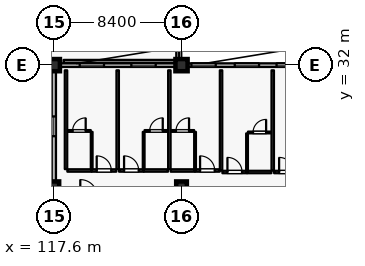
"""IFC4 building model, lengths in metres.
Left out: names, types, materials, properties, quantities, classifications, styles, units other than length and angle.
Written with IfcOpenShell. Run it as: python <this file> out.ifc"""

import sys

from ifc_helpers import new_model, si_unit, direction, frame, frame_2d, origin, origin_2d, place, context, subcontext, project, spatial, rectangle, extrude, element, fill, save


model = new_model("IFC4")
c1 = context("Model", 3, precision=1e-05, world=origin(), true_north=direction((0.0, 1.0)))
c2 = subcontext(c1, "Body", "Model", "MODEL_VIEW")
j1 = project(units=[si_unit("LENGTHUNIT", "METRE"), si_unit("PLANEANGLEUNIT", "RADIAN")], contexts=[c1])
p1 = place(None, origin())
s1 = spatial("IfcSite", under=j1, at=p1, CompositionType="ELEMENT")
p2 = place(p1, origin())
s2 = spatial("IfcBuilding", under=s1, at=p2, CompositionType="ELEMENT")
p3 = place(p2, frame((0.0, 0.0, 21.0)))
s3 = spatial("IfcBuildingStorey", under=s2, at=p3, CompositionType="ELEMENT", Elevation=21.0)
for number, where, z_axis, x_axis in (
    (1, (117.6, 32.0, 0.0), (0.0, 0.0, 1.0), (1.0, 0.0, 0.0)),
    (2, (126.0, 32.0, 0.0), (0.0, 0.0, 1.0), (1.0, 0.0, 0.0)),
):
    element("IfcColumn", number, at=place(p3, frame(where, z_axis=z_axis, x_axis=x_axis)), inside=s3, PredefinedType="COLUMN", context=c2, shape_type="SweptSolid", body=[
        extrude(rectangle(XDim=0.8, YDim=0.8, at=origin_2d()), origin(), (0.0, 0.0, 1.0), 4.2),
    ])
for number, where, z_axis, x_axis in (
    (3, (117.6, 24.0, 0.0), (0.0, 0.0, 1.0), (1.0, 0.0, 0.0)),
    (4, (126.0, 24.0, 0.0), (0.0, 0.0, 1.0), (1.0, 0.0, 0.0)),
):
    element("IfcColumn", number, at=place(p3, frame(where, z_axis=z_axis, x_axis=x_axis)), inside=s3, PredefinedType="COLUMN", context=c2, shape_type="SweptSolid", body=[
        extrude(rectangle(XDim=0.7, YDim=0.7, at=origin_2d()), origin(), (0.0, 0.0, 1.0), 4.2),
    ])
p4 = place(p3, frame((118.0, 32.0, 0.0), z_axis=(0.0, 0.0, 1.0), x_axis=(1.0, 0.0, 0.0)))
e5 = element("IfcWall", 5, at=p4, inside=s3, PredefinedType="SOLIDWALL", context=c2, shape_type="SweptSolid", body=[
    extrude(rectangle(XDim=7.6, YDim=0.24, at=frame_2d((3.8, 0.0))), origin(), (0.0, 0.0, 1.0), 3.53),
])
p5 = place(p4, frame((1.3, 0.0, 0.8)))
e6 = element("IfcOpeningElement", 6, at=p5, cuts=e5, PredefinedType="OPENING", context=c2, shape_type="SweptSolid", body=[
    extrude(rectangle(XDim=1.6, YDim=1.6, at=frame_2d((0.8, 0.8))), frame((0.0, 0.13, 0.0), z_axis=(0.0, -1.0, 0.0), x_axis=(1.0, 0.0, 0.0)), (0.0, 0.0, 1.0), 0.26),
])
p6 = place(p4, frame((4.7, 0.0, 0.8)))
e7 = element("IfcOpeningElement", 7, at=p6, cuts=e5, PredefinedType="OPENING", context=c2, shape_type="SweptSolid", body=[
    extrude(rectangle(XDim=1.6, YDim=1.6, at=frame_2d((0.8, 0.8))), frame((0.0, 0.13, 0.0), z_axis=(0.0, -1.0, 0.0), x_axis=(1.0, 0.0, 0.0)), (0.0, 0.0, 1.0), 0.26),
])
p7 = place(p3, frame((126.4, 32.0, 0.0), z_axis=(0.0, 0.0, 1.0), x_axis=(1.0, 0.0, 0.0)))
e8 = element("IfcWall", 8, at=p7, inside=s3, PredefinedType="SOLIDWALL", context=c2, shape_type="SweptSolid", body=[
    extrude(rectangle(XDim=7.6, YDim=0.24, at=frame_2d((3.8, 0.0))), origin(), (0.0, 0.0, 1.0), 3.53),
])
p8 = place(p7, frame((0.25, 0.0, 0.8)))
e9 = element("IfcOpeningElement", 9, at=p8, cuts=e8, PredefinedType="OPENING", context=c2, shape_type="SweptSolid", body=[
    extrude(rectangle(XDim=1.6, YDim=1.6, at=frame_2d((0.8, 0.8))), frame((0.0, 0.13, 0.0), z_axis=(0.0, -1.0, 0.0), x_axis=(1.0, 0.0, 0.0)), (0.0, 0.0, 1.0), 0.26),
])
p9 = place(p7, frame((3.1, 0.0, 0.8)))
e10 = element("IfcOpeningElement", 10, at=p9, cuts=e8, PredefinedType="OPENING", context=c2, shape_type="SweptSolid", body=[
    extrude(rectangle(XDim=1.6, YDim=1.6, at=frame_2d((0.8, 0.8))), frame((0.0, 0.13, 0.0), z_axis=(0.0, -1.0, 0.0), x_axis=(1.0, 0.0, 0.0)), (0.0, 0.0, 1.0), 0.26),
])
p10 = place(p7, frame((5.85, 0.0, 0.8)))
e11 = element("IfcOpeningElement", 11, at=p10, cuts=e8, PredefinedType="OPENING", context=c2, shape_type="SweptSolid", body=[
    extrude(rectangle(XDim=1.6, YDim=1.6, at=frame_2d((0.8, 0.8))), frame((0.0, 0.13, 0.0), z_axis=(0.0, -1.0, 0.0), x_axis=(1.0, 0.0, 0.0)), (0.0, 0.0, 1.0), 0.26),
])
p11 = place(p3, frame((117.6, 24.35, 0.0), z_axis=(0.0, 0.0, 1.0), x_axis=(0.0, 1.0, 0.0)))
e12 = element("IfcWall", 12, at=p11, inside=s3, PredefinedType="SOLIDWALL", context=c2, shape_type="SweptSolid", body=[
    extrude(rectangle(XDim=7.25, YDim=0.28, at=frame_2d((3.625, 0.0))), origin(), (0.0, 0.0, 1.0), 3.3),
])
p12 = place(p11, frame((2.975, 0.0, 0.75)))
e13 = element("IfcOpeningElement", 13, at=p12, cuts=e12, PredefinedType="OPENING", context=c2, shape_type="SweptSolid", body=[
    extrude(rectangle(XDim=1.3, YDim=1.65, at=frame_2d((0.65, 0.825))), frame((0.0, 0.15, 0.0), z_axis=(0.0, -1.0, 0.0), x_axis=(1.0, 0.0, 0.0)), (0.0, 0.0, 1.0), 0.3),
])
p13 = place(p3, frame((125.75, 71.61, 0.0), z_axis=(0.0, 0.0, 1.0), x_axis=(0.0, -1.0, 0.0)))
e14 = element("IfcWall", 14, at=p13, inside=s3, PredefinedType="PARAPET", context=c2, shape_type="SweptSolid", body=[
    extrude(rectangle(XDim=39.22, YDim=0.19, at=frame_2d((19.61, 0.0))), origin(), (0.0, 0.0, 1.0), 1.2),
])
p14 = place(p3, frame((125.61, 32.25, 0.0), z_axis=(0.0, 0.0, 1.0), x_axis=(-1.0, 0.0, 0.0)))
e15 = element("IfcWall", 15, at=p14, inside=s3, PredefinedType="PARAPET", context=c2, shape_type="SweptSolid", body=[
    extrude(rectangle(XDim=7.37, YDim=0.19, at=frame_2d((3.685, 0.0))), origin(), (0.0, 0.0, 1.0), 1.2),
])
p15 = place(p3, frame((118.49, 25.07, 0.0), z_axis=(0.0, 0.0, 1.0), x_axis=(1.0, 0.0, 0.0)))
e16 = element("IfcWall", 16, at=p15, inside=s3, PredefinedType="PARTITIONING", context=c2, shape_type="SweptSolid", body=[
    extrude(rectangle(XDim=1.59, YDim=0.16, at=frame_2d((0.795, 0.0))), origin(), (0.0, 0.0, 1.0), 3.965),
])
p16 = place(p3, frame((120.09, 25.07, 0.0), z_axis=(0.0, 0.0, 1.0), x_axis=(1.0, 0.0, 0.0)))
e17 = element("IfcWall", 17, at=p16, inside=s3, PredefinedType="PARTITIONING", context=c2, shape_type="SweptSolid", body=[
    extrude(rectangle(XDim=1.62, YDim=0.16, at=frame_2d((0.81, 0.0))), origin(), (0.0, 0.0, 1.0), 3.965),
])
p17 = place(p16, frame((0.33, 0.0, 0.0)))
e18 = element("IfcOpeningElement", 18, at=p17, cuts=e17, PredefinedType="OPENING", context=c2, shape_type="SweptSolid", body=[
    extrude(rectangle(XDim=0.96, YDim=2.2, at=frame_2d((0.48, 1.1))), frame((0.0, 0.09, 0.0), z_axis=(0.0, -1.0, 0.0), x_axis=(1.0, 0.0, 0.0)), (0.0, 0.0, 1.0), 0.18),
])
p18 = place(p3, frame((120.09, 25.16, 0.0), z_axis=(0.0, 0.0, 1.0), x_axis=(0.0, 1.0, 0.0)))
e19 = element("IfcWall", 19, at=p18, inside=s3, PredefinedType="PARTITIONING", context=c2, shape_type="SweptSolid", body=[
    extrude(rectangle(XDim=2.45, YDim=0.115, at=frame_2d((1.225, 0.0))), origin(), (0.0, 0.0, 1.0), 3.965),
])
p19 = place(p3, frame((118.5, 27.67, 0.0), z_axis=(0.0, 0.0, 1.0), x_axis=(1.0, 0.0, 0.0)))
e20 = element("IfcWall", 20, at=p19, inside=s3, PredefinedType="PARTITIONING", context=c2, shape_type="SweptSolid", body=[
    extrude(rectangle(XDim=1.53, YDim=0.115, at=frame_2d((0.765, 0.0))), origin(), (0.0, 0.0, 1.0), 3.965),
])
p20 = place(p19, frame((0.335, 0.0, 0.0)))
e21 = element("IfcOpeningElement", 21, at=p20, cuts=e20, PredefinedType="OPENING", context=c2, shape_type="SweptSolid", body=[
    extrude(rectangle(XDim=0.86, YDim=2.12, at=frame_2d((0.43, 1.06))), frame((0.0, 0.067, 0.0), z_axis=(0.0, -1.0, 0.0), x_axis=(1.0, 0.0, 0.0)), (0.0, 0.0, 1.0), 0.135),
])
p21 = place(p3, frame((118.4, 25.16, 0.0), z_axis=(0.0, 0.0, 1.0), x_axis=(0.0, 1.0, 0.0)))
e22 = element("IfcWall", 22, at=p21, inside=s3, PredefinedType="PARTITIONING", context=c2, shape_type="SweptSolid", body=[
    extrude(rectangle(XDim=6.5, YDim=0.16, at=frame_2d((3.25, 0.0))), origin(), (0.0, 0.0, 1.0), 3.965),
])
p22 = place(p3, frame((121.89, 25.07, 0.0), z_axis=(0.0, 0.0, 1.0), x_axis=(1.0, 0.0, 0.0)))
e23 = element("IfcWall", 23, at=p22, inside=s3, PredefinedType="PARTITIONING", context=c2, shape_type="SweptSolid", body=[
    extrude(rectangle(XDim=1.62, YDim=0.16, at=frame_2d((0.81, 0.0))), origin(), (0.0, 0.0, 1.0), 3.965),
])
p23 = place(p22, frame((0.33, 0.0, 0.0)))
e24 = element("IfcOpeningElement", 24, at=p23, cuts=e23, PredefinedType="OPENING", context=c2, shape_type="SweptSolid", body=[
    extrude(rectangle(XDim=0.96, YDim=2.2, at=frame_2d((0.48, 1.1))), frame((0.0, 0.09, 0.0), z_axis=(0.0, -1.0, 0.0), x_axis=(1.0, 0.0, 0.0)), (0.0, 0.0, 1.0), 0.18),
])
p24 = place(p3, frame((123.52, 25.07, 0.0), z_axis=(0.0, 0.0, 1.0), x_axis=(1.0, 0.0, 0.0)))
e25 = element("IfcWall", 25, at=p24, inside=s3, PredefinedType="PARTITIONING", context=c2, shape_type="SweptSolid", body=[
    extrude(rectangle(XDim=1.59, YDim=0.16, at=frame_2d((0.795, 0.0))), origin(), (0.0, 0.0, 1.0), 3.965),
])
p25 = place(p3, frame((123.51, 25.16, 0.0), z_axis=(0.0, 0.0, 1.0), x_axis=(0.0, 1.0, 0.0)))
e26 = element("IfcWall", 26, at=p25, inside=s3, PredefinedType="PARTITIONING", context=c2, shape_type="SweptSolid", body=[
    extrude(rectangle(XDim=2.45, YDim=0.115, at=frame_2d((1.225, 0.0))), origin(), (0.0, 0.0, 1.0), 3.965),
])
p26 = place(p3, frame((123.57, 27.67, 0.0), z_axis=(0.0, 0.0, 1.0), x_axis=(1.0, 0.0, 0.0)))
e27 = element("IfcWall", 27, at=p26, inside=s3, PredefinedType="PARTITIONING", context=c2, shape_type="SweptSolid", body=[
    extrude(rectangle(XDim=1.53, YDim=0.115, at=frame_2d((0.765, 0.0))), origin(), (0.0, 0.0, 1.0), 3.965),
])
p27 = place(p26, frame((0.335, 0.0, 0.0)))
e28 = element("IfcOpeningElement", 28, at=p27, cuts=e27, PredefinedType="OPENING", context=c2, shape_type="SweptSolid", body=[
    extrude(rectangle(XDim=0.86, YDim=2.12, at=frame_2d((0.43, 1.06))), frame((0.0, 0.067, 0.0), z_axis=(0.0, -1.0, 0.0), x_axis=(1.0, 0.0, 0.0)), (0.0, 0.0, 1.0), 0.135),
])
p28 = place(p3, frame((121.8, 25.16, 0.0), z_axis=(0.0, 0.0, 1.0), x_axis=(0.0, 1.0, 0.0)))
e29 = element("IfcWall", 29, at=p28, inside=s3, PredefinedType="PARTITIONING", context=c2, shape_type="SweptSolid", body=[
    extrude(rectangle(XDim=6.5, YDim=0.16, at=frame_2d((3.25, 0.0))), origin(), (0.0, 0.0, 1.0), 3.965),
])
p29 = place(p3, frame((125.29, 25.07, 0.0), z_axis=(0.0, 0.0, 1.0), x_axis=(1.0, 0.0, 0.0)))
e30 = element("IfcWall", 30, at=p29, inside=s3, PredefinedType="PARTITIONING", context=c2, shape_type="SweptSolid", body=[
    extrude(rectangle(XDim=1.59, YDim=0.16, at=frame_2d((0.795, 0.0))), origin(), (0.0, 0.0, 1.0), 3.965),
])
p30 = place(p3, frame((126.89, 25.07, 0.0), z_axis=(0.0, 0.0, 1.0), x_axis=(1.0, 0.0, 0.0)))
e31 = element("IfcWall", 31, at=p30, inside=s3, PredefinedType="PARTITIONING", context=c2, shape_type="SweptSolid", body=[
    extrude(rectangle(XDim=1.62, YDim=0.16, at=frame_2d((0.81, 0.0))), origin(), (0.0, 0.0, 1.0), 3.965),
])
p31 = place(p30, frame((0.33, 0.0, 0.0)))
e32 = element("IfcOpeningElement", 32, at=p31, cuts=e31, PredefinedType="OPENING", context=c2, shape_type="SweptSolid", body=[
    extrude(rectangle(XDim=0.96, YDim=2.2, at=frame_2d((0.48, 1.1))), frame((0.0, 0.09, 0.0), z_axis=(0.0, -1.0, 0.0), x_axis=(1.0, 0.0, 0.0)), (0.0, 0.0, 1.0), 0.18),
])
p32 = place(p3, frame((126.89, 25.16, 0.0), z_axis=(0.0, 0.0, 1.0), x_axis=(0.0, 1.0, 0.0)))
e33 = element("IfcWall", 33, at=p32, inside=s3, PredefinedType="PARTITIONING", context=c2, shape_type="SweptSolid", body=[
    extrude(rectangle(XDim=2.45, YDim=0.115, at=frame_2d((1.225, 0.0))), origin(), (0.0, 0.0, 1.0), 3.965),
])
p33 = place(p3, frame((125.3, 27.67, 0.0), z_axis=(0.0, 0.0, 1.0), x_axis=(1.0, 0.0, 0.0)))
e34 = element("IfcWall", 34, at=p33, inside=s3, PredefinedType="PARTITIONING", context=c2, shape_type="SweptSolid", body=[
    extrude(rectangle(XDim=1.53, YDim=0.115, at=frame_2d((0.765, 0.0))), origin(), (0.0, 0.0, 1.0), 3.965),
])
p34 = place(p33, frame((0.335, 0.0, 0.0)))
e35 = element("IfcOpeningElement", 35, at=p34, cuts=e34, PredefinedType="OPENING", context=c2, shape_type="SweptSolid", body=[
    extrude(rectangle(XDim=0.86, YDim=2.12, at=frame_2d((0.43, 1.06))), frame((0.0, 0.067, 0.0), z_axis=(0.0, -1.0, 0.0), x_axis=(1.0, 0.0, 0.0)), (0.0, 0.0, 1.0), 0.135),
])
p35 = place(p3, frame((125.2, 25.16, 0.0), z_axis=(0.0, 0.0, 1.0), x_axis=(0.0, 1.0, 0.0)))
e36 = element("IfcWall", 36, at=p35, inside=s3, PredefinedType="PARTITIONING", context=c2, shape_type="SweptSolid", body=[
    extrude(rectangle(XDim=6.5, YDim=0.16, at=frame_2d((3.25, 0.0))), origin(), (0.0, 0.0, 1.0), 3.965),
])
p36 = place(p3, frame((128.69, 24.97, 0.0), z_axis=(0.0, 0.0, 1.0), x_axis=(1.0, 0.0, 0.0)))
e37 = element("IfcWall", 37, at=p36, inside=s3, PredefinedType="PARTITIONING", context=c2, shape_type="SweptSolid", body=[
    extrude(rectangle(XDim=1.62, YDim=0.16, at=frame_2d((0.81, 0.0))), origin(), (0.0, 0.0, 1.0), 3.965),
])
p37 = place(p36, frame((0.33, 0.0, 0.0)))
e38 = element("IfcOpeningElement", 38, at=p37, cuts=e37, PredefinedType="OPENING", context=c2, shape_type="SweptSolid", body=[
    extrude(rectangle(XDim=0.96, YDim=2.2, at=frame_2d((0.48, 1.1))), frame((0.0, 0.09, 0.0), z_axis=(0.0, -1.0, 0.0), x_axis=(1.0, 0.0, 0.0)), (0.0, 0.0, 1.0), 0.18),
])
p38 = place(p3, frame((130.32, 24.97, 0.0), z_axis=(0.0, 0.0, 1.0), x_axis=(1.0, 0.0, 0.0)))
e39 = element("IfcWall", 39, at=p38, inside=s3, PredefinedType="PARTITIONING", context=c2, shape_type="SweptSolid", body=[
    extrude(rectangle(XDim=1.59, YDim=0.16, at=frame_2d((0.795, 0.0))), origin(), (0.0, 0.0, 1.0), 3.965),
])
p39 = place(p3, frame((130.31, 25.06, 0.0), z_axis=(0.0, 0.0, 1.0), x_axis=(0.0, 1.0, 0.0)))
e40 = element("IfcWall", 40, at=p39, inside=s3, PredefinedType="PARTITIONING", context=c2, shape_type="SweptSolid", body=[
    extrude(rectangle(XDim=2.45, YDim=0.115, at=frame_2d((1.225, 0.0))), origin(), (0.0, 0.0, 1.0), 3.965),
])
p40 = place(p3, frame((130.37, 27.57, 0.0), z_axis=(0.0, 0.0, 1.0), x_axis=(1.0, 0.0, 0.0)))
e41 = element("IfcWall", 41, at=p40, inside=s3, PredefinedType="PARTITIONING", context=c2, shape_type="SweptSolid", body=[
    extrude(rectangle(XDim=1.53, YDim=0.115, at=frame_2d((0.765, 0.0))), origin(), (0.0, 0.0, 1.0), 3.965),
])
p41 = place(p40, frame((0.335, 0.0, 0.0)))
e42 = element("IfcOpeningElement", 42, at=p41, cuts=e41, PredefinedType="OPENING", context=c2, shape_type="SweptSolid", body=[
    extrude(rectangle(XDim=0.86, YDim=2.12, at=frame_2d((0.43, 1.06))), frame((0.0, 0.067, 0.0), z_axis=(0.0, -1.0, 0.0), x_axis=(1.0, 0.0, 0.0)), (0.0, 0.0, 1.0), 0.135),
])
p42 = place(p3, frame((128.6, 25.06, 0.0), z_axis=(0.0, 0.0, 1.0), x_axis=(0.0, 1.0, 0.0)))
e43 = element("IfcWall", 43, at=p42, inside=s3, PredefinedType="PARTITIONING", context=c2, shape_type="SweptSolid", body=[
    extrude(rectangle(XDim=6.6, YDim=0.16, at=frame_2d((3.3, 0.0))), origin(), (0.0, 0.0, 1.0), 3.965),
])
p43 = place(p3, frame((132.09, 24.97, 0.0), z_axis=(0.0, 0.0, 1.0), x_axis=(1.0, 0.0, 0.0)))
e44 = element("IfcWall", 44, at=p43, inside=s3, PredefinedType="PARTITIONING", context=c2, shape_type="SweptSolid", body=[
    extrude(rectangle(XDim=1.62, YDim=0.16, at=frame_2d((0.81, 0.0))), origin(), (0.0, 0.0, 1.0), 3.965),
])
p44 = place(p43, frame((0.33, 0.0, 0.0)))
e45 = element("IfcOpeningElement", 45, at=p44, cuts=e44, PredefinedType="OPENING", context=c2, shape_type="SweptSolid", body=[
    extrude(rectangle(XDim=0.96, YDim=2.2, at=frame_2d((0.48, 1.1))), frame((0.0, 0.09, 0.0), z_axis=(0.0, -1.0, 0.0), x_axis=(1.0, 0.0, 0.0)), (0.0, 0.0, 1.0), 0.18),
])
p45 = place(p3, frame((132.0, 25.06, 0.0), z_axis=(0.0, 0.0, 1.0), x_axis=(0.0, 1.0, 0.0)))
e46 = element("IfcWall", 46, at=p45, inside=s3, PredefinedType="PARTITIONING", context=c2, shape_type="SweptSolid", body=[
    extrude(rectangle(XDim=6.6, YDim=0.16, at=frame_2d((3.3, 0.0))), origin(), (0.0, 0.0, 1.0), 3.965),
])
p46 = place(p5, origin())
e47 = element("IfcWindow", 47, at=p46, inside=s3, PartitioningType="SINGLE_PANEL", PredefinedType="WINDOW", context=c2, shape_type="SweptSolid", body=[
    extrude(rectangle(XDim=1.6, YDim=1.6, at=frame_2d((0.8, 0.8))), frame((0.0, 0.03, 0.0), z_axis=(0.0, -1.0, 0.0), x_axis=(1.0, 0.0, 0.0)), (0.0, 0.0, 1.0), 0.06),
])
fill(e6, e47)
p47 = place(p6, origin())
e48 = element("IfcWindow", 48, at=p47, inside=s3, PartitioningType="SINGLE_PANEL", PredefinedType="WINDOW", context=c2, shape_type="SweptSolid", body=[
    extrude(rectangle(XDim=1.6, YDim=1.6, at=frame_2d((0.8, 0.8))), frame((0.0, 0.03, 0.0), z_axis=(0.0, -1.0, 0.0), x_axis=(1.0, 0.0, 0.0)), (0.0, 0.0, 1.0), 0.06),
])
fill(e7, e48)
p48 = place(p8, origin())
e49 = element("IfcWindow", 49, at=p48, inside=s3, PartitioningType="SINGLE_PANEL", PredefinedType="WINDOW", context=c2, shape_type="SweptSolid", body=[
    extrude(rectangle(XDim=1.6, YDim=1.6, at=frame_2d((0.8, 0.8))), frame((0.0, 0.03, 0.0), z_axis=(0.0, -1.0, 0.0), x_axis=(1.0, 0.0, 0.0)), (0.0, 0.0, 1.0), 0.06),
])
fill(e9, e49)
p49 = place(p9, origin())
e50 = element("IfcWindow", 50, at=p49, inside=s3, PartitioningType="SINGLE_PANEL", PredefinedType="WINDOW", context=c2, shape_type="SweptSolid", body=[
    extrude(rectangle(XDim=1.6, YDim=1.6, at=frame_2d((0.8, 0.8))), frame((0.0, 0.03, 0.0), z_axis=(0.0, -1.0, 0.0), x_axis=(1.0, 0.0, 0.0)), (0.0, 0.0, 1.0), 0.06),
])
fill(e10, e50)
p50 = place(p10, origin())
e51 = element("IfcWindow", 51, at=p50, inside=s3, PartitioningType="SINGLE_PANEL", PredefinedType="WINDOW", context=c2, shape_type="SweptSolid", body=[
    extrude(rectangle(XDim=1.6, YDim=1.6, at=frame_2d((0.8, 0.8))), frame((0.0, 0.03, 0.0), z_axis=(0.0, -1.0, 0.0), x_axis=(1.0, 0.0, 0.0)), (0.0, 0.0, 1.0), 0.06),
])
fill(e11, e51)
p51 = place(p12, origin())
e52 = element("IfcWindow", 52, at=p51, inside=s3, PartitioningType="SINGLE_PANEL", PredefinedType="WINDOW", context=c2, shape_type="SweptSolid", body=[
    extrude(rectangle(XDim=1.3, YDim=1.65, at=frame_2d((0.65, 0.825))), frame((0.0, 0.03, 0.0), z_axis=(0.0, -1.0, 0.0), x_axis=(1.0, 0.0, 0.0)), (0.0, 0.0, 1.0), 0.06),
])
fill(e13, e52)
p52 = place(p17, origin())
e53 = element("IfcDoor", 53, at=p52, inside=s3, OperationType="SINGLE_SWING_LEFT", PredefinedType="DOOR", context=c2, shape_type="SweptSolid", body=[
    extrude(rectangle(XDim=0.96, YDim=2.2, at=frame_2d((0.48, 1.1))), frame((0.0, 0.025, 0.0), z_axis=(0.0, -1.0, 0.0), x_axis=(1.0, 0.0, 0.0)), (0.0, 0.0, 1.0), 0.05),
])
fill(e18, e53)
p53 = place(p20, origin())
e54 = element("IfcDoor", 54, at=p53, inside=s3, OperationType="SINGLE_SWING_RIGHT", PredefinedType="DOOR", context=c2, shape_type="SweptSolid", body=[
    extrude(rectangle(XDim=0.86, YDim=2.12, at=frame_2d((0.43, 1.06))), frame((0.0, 0.025, 0.0), z_axis=(0.0, -1.0, 0.0), x_axis=(1.0, 0.0, 0.0)), (0.0, 0.0, 1.0), 0.05),
])
fill(e21, e54)
p54 = place(p23, origin())
e55 = element("IfcDoor", 55, at=p54, inside=s3, OperationType="SINGLE_SWING_LEFT", PredefinedType="DOOR", context=c2, shape_type="SweptSolid", body=[
    extrude(rectangle(XDim=0.96, YDim=2.2, at=frame_2d((0.48, 1.1))), frame((0.0, 0.025, 0.0), z_axis=(0.0, -1.0, 0.0), x_axis=(1.0, 0.0, 0.0)), (0.0, 0.0, 1.0), 0.05),
])
fill(e24, e55)
p55 = place(p27, origin())
e56 = element("IfcDoor", 56, at=p55, inside=s3, OperationType="SINGLE_SWING_RIGHT", PredefinedType="DOOR", context=c2, shape_type="SweptSolid", body=[
    extrude(rectangle(XDim=0.86, YDim=2.12, at=frame_2d((0.43, 1.06))), frame((0.0, 0.025, 0.0), z_axis=(0.0, -1.0, 0.0), x_axis=(1.0, 0.0, 0.0)), (0.0, 0.0, 1.0), 0.05),
])
fill(e28, e56)
p56 = place(p31, origin())
e57 = element("IfcDoor", 57, at=p56, inside=s3, OperationType="SINGLE_SWING_LEFT", PredefinedType="DOOR", context=c2, shape_type="SweptSolid", body=[
    extrude(rectangle(XDim=0.96, YDim=2.2, at=frame_2d((0.48, 1.1))), frame((0.0, 0.025, 0.0), z_axis=(0.0, -1.0, 0.0), x_axis=(1.0, 0.0, 0.0)), (0.0, 0.0, 1.0), 0.05),
])
fill(e32, e57)
p57 = place(p34, origin())
e58 = element("IfcDoor", 58, at=p57, inside=s3, OperationType="SINGLE_SWING_RIGHT", PredefinedType="DOOR", context=c2, shape_type="SweptSolid", body=[
    extrude(rectangle(XDim=0.86, YDim=2.12, at=frame_2d((0.43, 1.06))), frame((0.0, 0.025, 0.0), z_axis=(0.0, -1.0, 0.0), x_axis=(1.0, 0.0, 0.0)), (0.0, 0.0, 1.0), 0.05),
])
fill(e35, e58)
p58 = place(p37, origin())
e59 = element("IfcDoor", 59, at=p58, inside=s3, OperationType="SINGLE_SWING_LEFT", PredefinedType="DOOR", context=c2, shape_type="SweptSolid", body=[
    extrude(rectangle(XDim=0.96, YDim=2.2, at=frame_2d((0.48, 1.1))), frame((0.0, 0.025, 0.0), z_axis=(0.0, -1.0, 0.0), x_axis=(1.0, 0.0, 0.0)), (0.0, 0.0, 1.0), 0.05),
])
fill(e38, e59)
p59 = place(p41, origin())
e60 = element("IfcDoor", 60, at=p59, inside=s3, OperationType="SINGLE_SWING_RIGHT", PredefinedType="DOOR", context=c2, shape_type="SweptSolid", body=[
    extrude(rectangle(XDim=0.86, YDim=2.12, at=frame_2d((0.43, 1.06))), frame((0.0, 0.025, 0.0), z_axis=(0.0, -1.0, 0.0), x_axis=(1.0, 0.0, 0.0)), (0.0, 0.0, 1.0), 0.05),
])
fill(e42, e60)
p60 = place(p44, origin())
e61 = element("IfcDoor", 61, at=p60, inside=s3, OperationType="SINGLE_SWING_LEFT", PredefinedType="DOOR", context=c2, shape_type="SweptSolid", body=[
    extrude(rectangle(XDim=0.96, YDim=2.2, at=frame_2d((0.48, 1.1))), frame((0.0, 0.025, 0.0), z_axis=(0.0, -1.0, 0.0), x_axis=(1.0, 0.0, 0.0)), (0.0, 0.0, 1.0), 0.05),
])
fill(e45, e61)
save(model, sys.argv[1])
